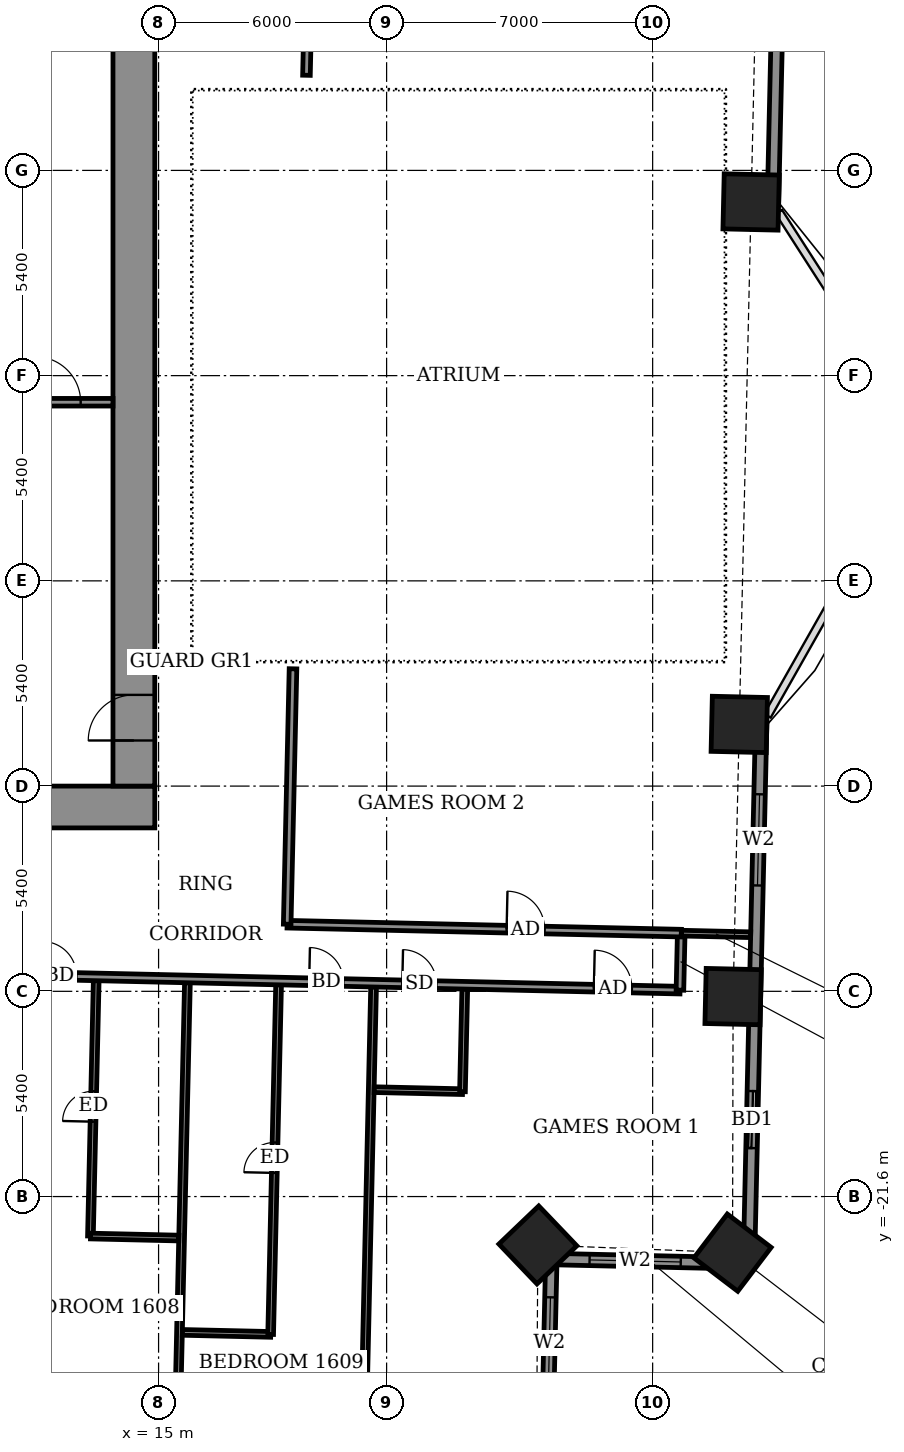
"""IFC4 building model, lengths in metres.
Left out: names, types, materials, properties, quantities, classifications, styles, units other than length and angle.
Written with IfcOpenShell. Run it as: python <this file> out.ifc"""

import sys

from ifc_helpers import new_model, si_unit, direction, frame, frame_2d, origin, origin_2d, place, context, subcontext, project, spatial, rectangle, extrude, element, fill, save


model = new_model("IFC4")
c1 = context("Model", 3, precision=1e-05, world=origin(), true_north=direction((0.0, 1.0)))
c2 = subcontext(c1, "Body", "Model", "MODEL_VIEW")
j1 = project(units=[si_unit("LENGTHUNIT", "METRE"), si_unit("PLANEANGLEUNIT", "RADIAN")], contexts=[c1])
p1 = place(None, origin())
s1 = spatial("IfcSite", under=j1, at=p1, CompositionType="ELEMENT")
p2 = place(p1, origin())
s2 = spatial("IfcBuilding", under=s1, at=p2, CompositionType="ELEMENT")
p3 = place(p2, frame((0.0, 0.0, 67.5)))
s3 = spatial("IfcBuildingStorey", under=s2, at=p3, CompositionType="ELEMENT", Elevation=67.5)
for number, where, z_axis, x_axis in (
    (1, (24.98, -22.873, -0.55), (0.0, 0.0, 1.0), (0.723, 0.691, 0.0)),
    (2, (30.102, -23.076, -0.55), (0.0, 0.0, 1.0), (0.606, 0.796, 0.0)),
    (3, (30.117, -16.339, -0.55), (0.0, 0.0, 1.0), (0.023, 1.0, 0.0)),
    (4, (30.279, -9.177, -0.55), (0.0, 0.0, 1.0), (0.023, 1.0, 0.0)),
    (5, (30.591, 4.569, -0.55), (0.0, 0.0, 1.0), (0.023, 1.0, 0.0)),
):
    element("IfcColumn", number, at=place(p3, frame(where, z_axis=z_axis, x_axis=x_axis)), inside=s3, PredefinedType="COLUMN", context=c2, shape_type="SweptSolid", body=[
        extrude(rectangle(XDim=1.45, YDim=1.45, at=origin_2d()), origin(), (0.0, 0.0, 1.0), 3.6),
    ])
p4 = place(p3, frame((30.533, -23.362, 0.0), z_axis=(0.0, 0.0, 1.0), x_axis=(0.022698800888, 0.999742349027, 0.0)))
e6 = element("IfcWall", 6, at=p4, inside=s3, PredefinedType="SOLIDWALL", context=c2, shape_type="SweptSolid", body=[
    extrude(rectangle(XDim=14.23, YDim=0.3, at=frame_2d((7.115, 0.0))), origin(), (0.0, 0.0, 1.0), 3.05),
])
p5 = place(p4, frame((3.038, 0.0, 0.0)))
e7 = element("IfcOpeningElement", 7, at=p5, cuts=e6, PredefinedType="OPENING", context=c2, shape_type="SweptSolid", body=[
    extrude(rectangle(XDim=1.5, YDim=2.4, at=frame_2d((0.75, 1.2))), frame((0.0, 0.16, 0.0), z_axis=(0.0, -1.0, 0.0), x_axis=(1.0, 0.0, 0.0)), (0.0, 0.0, 1.0), 0.32),
])
p6 = place(p4, frame((9.95, 0.0, 0.9)))
e8 = element("IfcOpeningElement", 8, at=p6, cuts=e6, PredefinedType="OPENING", context=c2, shape_type="SweptSolid", body=[
    extrude(rectangle(XDim=2.4, YDim=1.5, at=frame_2d((1.2, 0.75))), frame((0.0, 0.16, 0.0), z_axis=(0.0, -1.0, 0.0), x_axis=(1.0, 0.0, 0.0)), (0.0, 0.0, 1.0), 0.32),
])
p7 = place(p3, frame((31.165, 4.502, 0.0), z_axis=(0.0, 0.0, 1.0), x_axis=(0.022716307128, 0.999741951401, 0.0)))
e9 = element("IfcWall", 9, at=p7, inside=s3, PredefinedType="SOLIDWALL", context=c2, shape_type="SweptSolid", body=[
    extrude(rectangle(XDim=15.229, YDim=0.3, at=frame_2d((7.615, 0.0))), origin(), (0.0, 0.0, 1.0), 3.05),
])
p8 = place(p7, frame((6.059, 0.0, 0.9)))
e10 = element("IfcOpeningElement", 10, at=p8, cuts=e9, PredefinedType="OPENING", context=c2, shape_type="SweptSolid", body=[
    extrude(rectangle(XDim=0.9, YDim=1.5, at=frame_2d((0.45, 0.75))), frame((0.0, 0.16, 0.0), z_axis=(0.0, -1.0, 0.0), x_axis=(1.0, 0.0, 0.0)), (0.0, 0.0, 1.0), 0.32),
])
p9 = place(p7, frame((11.697, 0.0, 0.0)))
e11 = element("IfcOpeningElement", 11, at=p9, cuts=e9, PredefinedType="OPENING", context=c2, shape_type="SweptSolid", body=[
    extrude(rectangle(XDim=1.5, YDim=2.4, at=frame_2d((0.75, 1.2))), frame((0.0, 0.16, 0.0), z_axis=(0.0, -1.0, 0.0), x_axis=(1.0, 0.0, 0.0)), (0.0, 0.0, 1.0), 0.32),
])
p10 = place(p3, frame((25.216, -28.443, 0.0), z_axis=(0.0, 0.0, 1.0), x_axis=(0.022674484462, 0.999742900827, 0.0)))
e12 = element("IfcWall", 12, at=p10, inside=s3, PredefinedType="SOLIDWALL", context=c2, shape_type="SweptSolid", body=[
    extrude(rectangle(XDim=5.2, YDim=0.3, at=frame_2d((2.6, 0.0))), origin(), (0.0, 0.0, 1.0), 2.55),
])
p11 = place(p10, frame((1.793, 0.0, 0.9)))
e13 = element("IfcOpeningElement", 13, at=p11, cuts=e12, PredefinedType="OPENING", context=c2, shape_type="SweptSolid", body=[
    extrude(rectangle(XDim=2.4, YDim=1.5, at=frame_2d((1.2, 0.75))), frame((0.0, 0.16, 0.0), z_axis=(0.0, -1.0, 0.0), x_axis=(1.0, 0.0, 0.0)), (0.0, 0.0, 1.0), 0.32),
])
p12 = place(p3, frame((25.334, -23.244, 0.0), z_axis=(0.0, 0.0, 1.0), x_axis=(0.999741811307, -0.022722471786, 0.0)))
e14 = element("IfcWall", 14, at=p12, inside=s3, PredefinedType="SOLIDWALL", context=c2, shape_type="SweptSolid", body=[
    extrude(rectangle(XDim=5.2, YDim=0.3, at=frame_2d((2.6, 0.0))), origin(), (0.0, 0.0, 1.0), 2.55),
])
p13 = place(p12, frame((1.007, 0.0, 0.9)))
e15 = element("IfcOpeningElement", 15, at=p13, cuts=e14, PredefinedType="OPENING", context=c2, shape_type="SweptSolid", body=[
    extrude(rectangle(XDim=2.4, YDim=1.5, at=frame_2d((1.2, 0.75))), frame((0.0, 0.16, 0.0), z_axis=(0.0, -1.0, 0.0), x_axis=(1.0, 0.0, 0.0)), (0.0, 0.0, 1.0), 0.32),
])
p14 = place(p3, frame((15.484, -28.072, 0.0), z_axis=(0.0, 0.0, 1.0), x_axis=(0.02273928012, 0.99974142914, 0.0)))
e16 = element("IfcWall", 16, at=p14, inside=s3, PredefinedType="PARTITIONING", context=c2, shape_type="SweptSolid", body=[
    extrude(rectangle(XDim=12.1, YDim=0.15, at=frame_2d((6.05, 0.0))), origin(), (0.0, 0.0, 1.0), 2.55),
])
p15 = place(p3, frame((20.383, -28.183, 0.0), z_axis=(0.0, 0.0, 1.0), x_axis=(0.022637991173, 0.99974372784, 0.0)))
e17 = element("IfcWall", 17, at=p15, inside=s3, PredefinedType="PARTITIONING", context=c2, shape_type="SweptSolid", body=[
    extrude(rectangle(XDim=12.1, YDim=0.15, at=frame_2d((6.05, 0.0))), origin(), (0.0, 0.0, 1.0), 2.55),
])
p16 = place(p3, frame((15.627, -25.174, 0.0), z_axis=(0.0, 0.0, 1.0), x_axis=(0.999740260747, -0.02279059109, 0.0)))
e18 = element("IfcWall", 18, at=p16, inside=s3, PredefinedType="PARTITIONING", context=c2, shape_type="SweptSolid", body=[
    extrude(rectangle(XDim=2.324, YDim=0.15, at=frame_2d((1.162, 0.0))), origin(), (0.0, 0.0, 1.0), 3.05),
])
p17 = place(p3, frame((17.949, -25.227, 0.0), z_axis=(0.0, 0.0, 1.0), x_axis=(0.02271477479, 0.999741986218, 0.0)))
e19 = element("IfcWall", 19, at=p17, inside=s3, PredefinedType="PARTITIONING", context=c2, shape_type="SweptSolid", body=[
    extrude(rectangle(XDim=9.2, YDim=0.15, at=frame_2d((4.6, 0.0))), origin(), (0.0, 0.0, 1.0), 3.05),
])
p18 = place(p17, frame((4.25, 0.0, 0.0)))
e20 = element("IfcOpeningElement", 20, at=p18, cuts=e19, PredefinedType="OPENING", context=c2, shape_type="SweptSolid", body=[
    extrude(rectangle(XDim=0.8, YDim=2.1, at=frame_2d((0.4, 1.05))), frame((0.0, 0.085, 0.0), z_axis=(0.0, -1.0, 0.0), x_axis=(1.0, 0.0, 0.0)), (0.0, 0.0, 1.0), 0.17),
])
p19 = place(p3, frame((13.207, -22.639, 0.0), z_axis=(0.0, 0.0, 1.0), x_axis=(0.022595152847, 0.999744696944, 0.0)))
e21 = element("IfcWall", 21, at=p19, inside=s3, PredefinedType="PARTITIONING", context=c2, shape_type="SweptSolid", body=[
    extrude(rectangle(XDim=6.721, YDim=0.15, at=frame_2d((3.36, 0.0))), origin(), (0.0, 0.0, 1.0), 3.05),
])
p20 = place(p19, frame((3.01, 0.0, 0.0)))
e22 = element("IfcOpeningElement", 22, at=p20, cuts=e21, PredefinedType="OPENING", context=c2, shape_type="SweptSolid", body=[
    extrude(rectangle(XDim=0.8, YDim=2.1, at=frame_2d((0.4, 1.05))), frame((0.0, 0.085, 0.0), z_axis=(0.0, -1.0, 0.0), x_axis=(1.0, 0.0, 0.0)), (0.0, 0.0, 1.0), 0.17),
])
p21 = place(p3, frame((13.209, -22.639, 0.0), z_axis=(0.0, 0.0, 1.0), x_axis=(0.999740260747, -0.02279059109, 0.0)))
e23 = element("IfcWall", 23, at=p21, inside=s3, PredefinedType="PARTITIONING", context=c2, shape_type="SweptSolid", body=[
    extrude(rectangle(XDim=2.324, YDim=0.15, at=frame_2d((1.162, 0.0))), origin(), (0.0, 0.0, 1.0), 3.05),
])
p22 = place(p3, frame((20.673, -18.787, 0.0), z_axis=(0.0, 0.0, 1.0), x_axis=(0.999740478815, -0.022781023197, 0.0)))
e24 = element("IfcWall", 24, at=p22, inside=s3, PredefinedType="PARTITIONING", context=c2, shape_type="SweptSolid", body=[
    extrude(rectangle(XDim=2.325, YDim=0.15, at=frame_2d((1.163, 0.0))), origin(), (0.0, 0.0, 1.0), 3.05),
])
p23 = place(p3, frame((22.996, -18.84, 0.0), z_axis=(0.0, 0.0, 1.0), x_axis=(0.022518033722, 0.999746436932, 0.0)))
e25 = element("IfcWall", 25, at=p23, inside=s3, PredefinedType="PARTITIONING", context=c2, shape_type="SweptSolid", body=[
    extrude(rectangle(XDim=2.7, YDim=0.15, at=frame_2d((1.35, 0.0))), origin(), (0.0, 0.0, 1.0), 3.05),
])
p24 = place(p3, frame((-26.151, -14.924, 0.0), z_axis=(0.0, 0.0, 1.0), x_axis=(0.999742750999, -0.022681089575, 0.0)))
e26 = element("IfcWall", 26, at=p24, inside=s3, PredefinedType="PARTITIONING", context=c2, shape_type="SweptSolid", body=[
    extrude(rectangle(XDim=54.886, YDim=0.2, at=frame_2d((27.443, 0.0))), origin(), (0.0, 0.0, 1.0), 3.05),
])
p25 = place(p24, frame((1.345, 0.0, 0.0)))
e27 = element("IfcOpeningElement", 27, at=p25, cuts=e26, PredefinedType="OPENING", context=c2, shape_type="SweptSolid", body=[
    extrude(rectangle(XDim=1.0, YDim=2.1, at=frame_2d((0.5, 1.05))), frame((0.0, 0.11, 0.0), z_axis=(0.0, -1.0, 0.0), x_axis=(1.0, 0.0, 0.0)), (0.0, 0.0, 1.0), 0.22),
])
p26 = place(p24, frame((8.35, 0.0, 0.0)))
e28 = element("IfcOpeningElement", 28, at=p26, cuts=e26, PredefinedType="OPENING", context=c2, shape_type="SweptSolid", body=[
    extrude(rectangle(XDim=0.9, YDim=2.1, at=frame_2d((0.45, 1.05))), frame((0.0, 0.11, 0.0), z_axis=(0.0, -1.0, 0.0), x_axis=(1.0, 0.0, 0.0)), (0.0, 0.0, 1.0), 0.22),
])
p27 = place(p24, frame((10.625, 0.0, 0.0)))
e29 = element("IfcOpeningElement", 29, at=p27, cuts=e26, PredefinedType="OPENING", context=c2, shape_type="SweptSolid", body=[
    extrude(rectangle(XDim=0.9, YDim=2.1, at=frame_2d((0.45, 1.05))), frame((0.0, 0.11, 0.0), z_axis=(0.0, -1.0, 0.0), x_axis=(1.0, 0.0, 0.0)), (0.0, 0.0, 1.0), 0.22),
])
p28 = place(p24, frame((17.675, 0.0, 0.0)))
e30 = element("IfcOpeningElement", 30, at=p28, cuts=e26, PredefinedType="OPENING", context=c2, shape_type="SweptSolid", body=[
    extrude(rectangle(XDim=0.9, YDim=2.1, at=frame_2d((0.45, 1.05))), frame((0.0, 0.11, 0.0), z_axis=(0.0, -1.0, 0.0), x_axis=(1.0, 0.0, 0.0)), (0.0, 0.0, 1.0), 0.22),
])
p29 = place(p24, frame((19.725, 0.0, 0.0)))
e31 = element("IfcOpeningElement", 31, at=p29, cuts=e26, PredefinedType="OPENING", context=c2, shape_type="SweptSolid", body=[
    extrude(rectangle(XDim=0.9, YDim=2.1, at=frame_2d((0.45, 1.05))), frame((0.0, 0.11, 0.0), z_axis=(0.0, -1.0, 0.0), x_axis=(1.0, 0.0, 0.0)), (0.0, 0.0, 1.0), 0.22),
])
p30 = place(p24, frame((26.575, 0.0, 0.0)))
e32 = element("IfcOpeningElement", 32, at=p30, cuts=e26, PredefinedType="OPENING", context=c2, shape_type="SweptSolid", body=[
    extrude(rectangle(XDim=0.9, YDim=2.1, at=frame_2d((0.45, 1.05))), frame((0.0, 0.11, 0.0), z_axis=(0.0, -1.0, 0.0), x_axis=(1.0, 0.0, 0.0)), (0.0, 0.0, 1.0), 0.22),
])
p31 = place(p24, frame((28.75, 0.0, 0.0)))
e33 = element("IfcOpeningElement", 33, at=p31, cuts=e26, PredefinedType="OPENING", context=c2, shape_type="SweptSolid", body=[
    extrude(rectangle(XDim=0.9, YDim=2.1, at=frame_2d((0.45, 1.05))), frame((0.0, 0.11, 0.0), z_axis=(0.0, -1.0, 0.0), x_axis=(1.0, 0.0, 0.0)), (0.0, 0.0, 1.0), 0.22),
])
p32 = place(p24, frame((35.875, 0.0, 0.0)))
e34 = element("IfcOpeningElement", 34, at=p32, cuts=e26, PredefinedType="OPENING", context=c2, shape_type="SweptSolid", body=[
    extrude(rectangle(XDim=0.9, YDim=2.1, at=frame_2d((0.45, 1.05))), frame((0.0, 0.11, 0.0), z_axis=(0.0, -1.0, 0.0), x_axis=(1.0, 0.0, 0.0)), (0.0, 0.0, 1.0), 0.22),
])
p33 = place(p24, frame((38.1, 0.0, 0.0)))
e35 = element("IfcOpeningElement", 35, at=p33, cuts=e26, PredefinedType="OPENING", context=c2, shape_type="SweptSolid", body=[
    extrude(rectangle(XDim=0.9, YDim=2.1, at=frame_2d((0.45, 1.05))), frame((0.0, 0.11, 0.0), z_axis=(0.0, -1.0, 0.0), x_axis=(1.0, 0.0, 0.0)), (0.0, 0.0, 1.0), 0.22),
])
p34 = place(p24, frame((45.125, 0.0, 0.0)))
e36 = element("IfcOpeningElement", 36, at=p34, cuts=e26, PredefinedType="OPENING", context=c2, shape_type="SweptSolid", body=[
    extrude(rectangle(XDim=0.9, YDim=2.1, at=frame_2d((0.45, 1.05))), frame((0.0, 0.11, 0.0), z_axis=(0.0, -1.0, 0.0), x_axis=(1.0, 0.0, 0.0)), (0.0, 0.0, 1.0), 0.22),
])
p35 = place(p24, frame((52.618, 0.0, 0.0)))
e37 = element("IfcOpeningElement", 37, at=p35, cuts=e26, PredefinedType="OPENING", context=c2, shape_type="SweptSolid", body=[
    extrude(rectangle(XDim=1.0, YDim=2.1, at=frame_2d((0.5, 1.05))), frame((0.0, 0.11, 0.0), z_axis=(0.0, -1.0, 0.0), x_axis=(1.0, 0.0, 0.0)), (0.0, 0.0, 1.0), 0.22),
])
p36 = place(p24, frame((47.575, 0.0, 0.0)))
e38 = element("IfcOpeningElement", 38, at=p36, cuts=e26, PredefinedType="OPENING", context=c2, shape_type="SweptSolid", body=[
    extrude(rectangle(XDim=0.9, YDim=2.1, at=frame_2d((0.45, 1.05))), frame((0.0, 0.11, 0.0), z_axis=(0.0, -1.0, 0.0), x_axis=(1.0, 0.0, 0.0)), (0.0, 0.0, 1.0), 0.22),
])
p37 = place(p3, frame((28.718, -16.169, 0.0), z_axis=(0.0, 0.0, 1.0), x_axis=(0.022617910375, 0.999744182344, 0.0)))
e39 = element("IfcWall", 39, at=p37, inside=s3, PredefinedType="PARTITIONING", context=c2, shape_type="SweptSolid", body=[
    extrude(rectangle(XDim=1.5, YDim=0.2, at=frame_2d((0.75, 0.0))), origin(), (0.0, 0.0, 1.0), 3.05),
])
p38 = place(p3, frame((18.382, -14.434, 0.0), z_axis=(0.0, 0.0, 1.0), x_axis=(0.999743763457, -0.022636418209, 0.0)))
e40 = element("IfcWall", 40, at=p38, inside=s3, PredefinedType="PARTITIONING", context=c2, shape_type="SweptSolid", body=[
    extrude(rectangle(XDim=10.375, YDim=0.2, at=frame_2d((5.188, 0.0))), origin(), (0.0, 0.0, 1.0), 3.05),
])
p39 = place(p38, frame((5.777, 0.0, 0.0)))
e41 = element("IfcOpeningElement", 41, at=p39, cuts=e40, PredefinedType="OPENING", context=c2, shape_type="SweptSolid", body=[
    extrude(rectangle(XDim=1.0, YDim=2.1, at=frame_2d((0.5, 1.05))), frame((0.0, 0.11, 0.0), z_axis=(0.0, -1.0, 0.0), x_axis=(1.0, 0.0, 0.0)), (0.0, 0.0, 1.0), 0.22),
])
p40 = place(p3, frame((18.384, -14.434, 0.0), z_axis=(0.0, 0.0, 1.0), x_axis=(0.022773383809, 0.999740652864, 0.0)))
e42 = element("IfcWall", 42, at=p40, inside=s3, PredefinedType="PARTITIONING", context=c2, shape_type="SweptSolid", body=[
    extrude(rectangle(XDim=6.722, YDim=0.2, at=frame_2d((3.361, 0.0))), origin(), (0.0, 0.0, 1.0), 3.05),
])
p41 = place(p3, frame((28.755, -14.669, 0.0), z_axis=(0.0, 0.0, 1.0), x_axis=(0.999735161806, -0.023013175566, 0.0)))
e43 = element("IfcWall", 43, at=p41, inside=s3, PredefinedType="PARTITIONING", context=c2, shape_type="SweptSolid", body=[
    extrude(rectangle(XDim=1.825, YDim=0.15, at=frame_2d((0.912, 0.0))), origin(), (0.0, 0.0, 1.0), 2.55),
])
p42 = place(p3, frame((18.891, 7.903, 0.0), z_axis=(0.0, 0.0, 1.0), x_axis=(0.022807092041, 0.999739884446, 0.0)))
e44 = element("IfcWall", 44, at=p42, inside=s3, PredefinedType="PARTITIONING", context=c2, shape_type="SweptSolid", body=[
    extrude(rectangle(XDim=4.207, YDim=0.2, at=frame_2d((2.104, 0.0))), origin(), (0.0, 0.0, 1.0), 3.05),
])
p43 = place(p3, frame((-14.9, -11.35, 0.0), z_axis=(0.0, 0.0, 1.0), x_axis=(1.0, 0.0, 0.0)))
e45 = element("IfcWall", 45, at=p43, inside=s3, PredefinedType="SHEAR", context=c2, shape_type="SweptSolid", body=[
    extrude(rectangle(XDim=29.8, YDim=1.1, at=frame_2d((14.9, 0.0))), origin(), (0.0, 0.0, 1.0), 3.6),
])
p44 = place(p3, frame((14.35, -10.8, 0.0), z_axis=(0.0, 0.0, 1.0), x_axis=(0.0, 1.0, 0.0)))
e46 = element("IfcWall", 46, at=p44, inside=s3, PredefinedType="SHEAR", context=c2, shape_type="SweptSolid", body=[
    extrude(rectangle(XDim=21.6, YDim=1.1, at=frame_2d((10.8, 0.0))), origin(), (0.0, 0.0, 1.0), 3.6),
])
p45 = place(p44, frame((1.2, 0.0, 0.0)))
e47 = element("IfcOpeningElement", 47, at=p45, cuts=e46, PredefinedType="OPENING", context=c2, shape_type="SweptSolid", body=[
    extrude(rectangle(XDim=1.2, YDim=2.1, at=frame_2d((0.6, 1.05))), frame((0.0, 0.56, 0.0), z_axis=(0.0, -1.0, 0.0), x_axis=(1.0, 0.0, 0.0)), (0.0, 0.0, 1.0), 1.12),
])
p46 = place(p3, frame((10.9, -0.7, 0.0), z_axis=(0.0, 0.0, 1.0), x_axis=(1.0, 0.0, 0.0)))
e48 = element("IfcWall", 48, at=p46, inside=s3, PredefinedType="STANDARD", context=c2, shape_type="SweptSolid", body=[
    extrude(rectangle(XDim=2.9, YDim=0.2, at=frame_2d((1.45, 0.0))), origin(), (0.0, 0.0, 1.0), 3.05),
])
p47 = place(p46, frame((0.85, 0.0, 0.0)))
e49 = element("IfcOpeningElement", 49, at=p47, cuts=e48, PredefinedType="OPENING", context=c2, shape_type="SweptSolid", body=[
    extrude(rectangle(XDim=1.2, YDim=2.1, at=frame_2d((0.6, 1.05))), frame((0.0, 0.11, 0.0), z_axis=(0.0, -1.0, 0.0), x_axis=(1.0, 0.0, 0.0)), (0.0, 0.0, 1.0), 0.22),
])
p48 = place(p5, origin())
e50 = element("IfcDoor", 50, at=p48, inside=s3, OperationType="SLIDING_TO_LEFT", PredefinedType="DOOR", context=c2, shape_type="SweptSolid", body=[
    extrude(rectangle(XDim=1.5, YDim=2.4, at=frame_2d((0.75, 1.2))), frame((0.0, 0.025, 0.0), z_axis=(0.0, -1.0, 0.0), x_axis=(1.0, 0.0, 0.0)), (0.0, 0.0, 1.0), 0.05),
])
fill(e7, e50)
p49 = place(p6, origin())
e51 = element("IfcWindow", 51, at=p49, inside=s3, PartitioningType="DOUBLE_PANEL_VERTICAL", PredefinedType="WINDOW", context=c2, shape_type="SweptSolid", body=[
    extrude(rectangle(XDim=2.4, YDim=1.5, at=frame_2d((1.2, 0.75))), frame((0.0, 0.03, 0.0), z_axis=(0.0, -1.0, 0.0), x_axis=(1.0, 0.0, 0.0)), (0.0, 0.0, 1.0), 0.06),
])
fill(e8, e51)
p50 = place(p11, origin())
e52 = element("IfcWindow", 52, at=p50, inside=s3, PartitioningType="DOUBLE_PANEL_VERTICAL", PredefinedType="WINDOW", context=c2, shape_type="SweptSolid", body=[
    extrude(rectangle(XDim=2.4, YDim=1.5, at=frame_2d((1.2, 0.75))), frame((0.0, 0.03, 0.0), z_axis=(0.0, -1.0, 0.0), x_axis=(1.0, 0.0, 0.0)), (0.0, 0.0, 1.0), 0.06),
])
fill(e13, e52)
p51 = place(p13, origin())
e53 = element("IfcWindow", 53, at=p51, inside=s3, PartitioningType="DOUBLE_PANEL_VERTICAL", PredefinedType="WINDOW", context=c2, shape_type="SweptSolid", body=[
    extrude(rectangle(XDim=2.4, YDim=1.5, at=frame_2d((1.2, 0.75))), frame((0.0, 0.03, 0.0), z_axis=(0.0, -1.0, 0.0), x_axis=(1.0, 0.0, 0.0)), (0.0, 0.0, 1.0), 0.06),
])
fill(e15, e53)
p52 = place(p33, origin())
e54 = element("IfcDoor", 54, at=p52, inside=s3, OperationType="SINGLE_SWING_RIGHT", PredefinedType="DOOR", context=c2, shape_type="SweptSolid", body=[
    extrude(rectangle(XDim=0.9, YDim=2.1, at=frame_2d((0.45, 1.05))), frame((0.0, 0.025, 0.0), z_axis=(0.0, -1.0, 0.0), x_axis=(1.0, 0.0, 0.0)), (0.0, 0.0, 1.0), 0.05),
])
fill(e35, e54)
p53 = place(p20, origin())
e55 = element("IfcDoor", 55, at=p53, inside=s3, OperationType="SINGLE_SWING_RIGHT", PredefinedType="DOOR", context=c2, shape_type="SweptSolid", body=[
    extrude(rectangle(XDim=0.8, YDim=2.1, at=frame_2d((0.4, 1.05))), frame((0.0, 0.025, 0.0), z_axis=(0.0, -1.0, 0.0), x_axis=(1.0, 0.0, 0.0)), (0.0, 0.0, 1.0), 0.05),
])
fill(e22, e55)
p54 = place(p34, origin())
e56 = element("IfcDoor", 56, at=p54, inside=s3, OperationType="SINGLE_SWING_LEFT", PredefinedType="DOOR", context=c2, shape_type="SweptSolid", body=[
    extrude(rectangle(XDim=0.9, YDim=2.1, at=frame_2d((0.45, 1.05))), frame((0.0, 0.025, 0.0), z_axis=(0.0, -1.0, 0.0), x_axis=(1.0, 0.0, 0.0)), (0.0, 0.0, 1.0), 0.05),
])
fill(e36, e56)
p55 = place(p18, origin())
e57 = element("IfcDoor", 57, at=p55, inside=s3, OperationType="SINGLE_SWING_LEFT", PredefinedType="DOOR", context=c2, shape_type="SweptSolid", body=[
    extrude(rectangle(XDim=0.8, YDim=2.1, at=frame_2d((0.4, 1.05))), frame((0.0, 0.025, 0.0), z_axis=(0.0, -1.0, 0.0), x_axis=(1.0, 0.0, 0.0)), (0.0, 0.0, 1.0), 0.05),
])
fill(e20, e57)
p56 = place(p35, origin())
e58 = element("IfcDoor", 58, at=p56, inside=s3, OperationType="SINGLE_SWING_RIGHT", PredefinedType="DOOR", context=c2, shape_type="SweptSolid", body=[
    extrude(rectangle(XDim=1.0, YDim=2.1, at=frame_2d((0.5, 1.05))), frame((0.0, 0.025, 0.0), z_axis=(0.0, -1.0, 0.0), x_axis=(1.0, 0.0, 0.0)), (0.0, 0.0, 1.0), 0.05),
])
fill(e37, e58)
p57 = place(p36, origin())
e59 = element("IfcDoor", 59, at=p57, inside=s3, OperationType="SINGLE_SWING_LEFT", PredefinedType="DOOR", context=c2, shape_type="SweptSolid", body=[
    extrude(rectangle(XDim=0.9, YDim=2.1, at=frame_2d((0.45, 1.05))), frame((0.0, 0.025, 0.0), z_axis=(0.0, -1.0, 0.0), x_axis=(1.0, 0.0, 0.0)), (0.0, 0.0, 1.0), 0.05),
])
fill(e38, e59)
p58 = place(p39, origin())
e60 = element("IfcDoor", 60, at=p58, inside=s3, OperationType="SINGLE_SWING_LEFT", PredefinedType="DOOR", context=c2, shape_type="SweptSolid", body=[
    extrude(rectangle(XDim=1.0, YDim=2.1, at=frame_2d((0.5, 1.05))), frame((0.0, 0.025, 0.0), z_axis=(0.0, -1.0, 0.0), x_axis=(1.0, 0.0, 0.0)), (0.0, 0.0, 1.0), 0.05),
])
fill(e41, e60)
p59 = place(p45, origin())
e61 = element("IfcDoor", 61, at=p59, inside=s3, OperationType="DOUBLE_DOOR_SINGLE_SWING", PredefinedType="DOOR", context=c2, shape_type="SweptSolid", body=[
    extrude(rectangle(XDim=1.2, YDim=2.1, at=frame_2d((0.6, 1.05))), frame((0.0, 0.025, 0.0), z_axis=(0.0, -1.0, 0.0), x_axis=(1.0, 0.0, 0.0)), (0.0, 0.0, 1.0), 0.05),
])
fill(e47, e61)
p60 = place(p47, origin())
e62 = element("IfcDoor", 62, at=p60, inside=s3, OperationType="SINGLE_SWING_LEFT", PredefinedType="DOOR", context=c2, shape_type="SweptSolid", body=[
    extrude(rectangle(XDim=1.2, YDim=2.1, at=frame_2d((0.6, 1.05))), frame((0.0, 0.025, 0.0), z_axis=(0.0, -1.0, 0.0), x_axis=(1.0, 0.0, 0.0)), (0.0, 0.0, 1.0), 0.05),
])
fill(e49, e62)
save(model, sys.argv[1])
